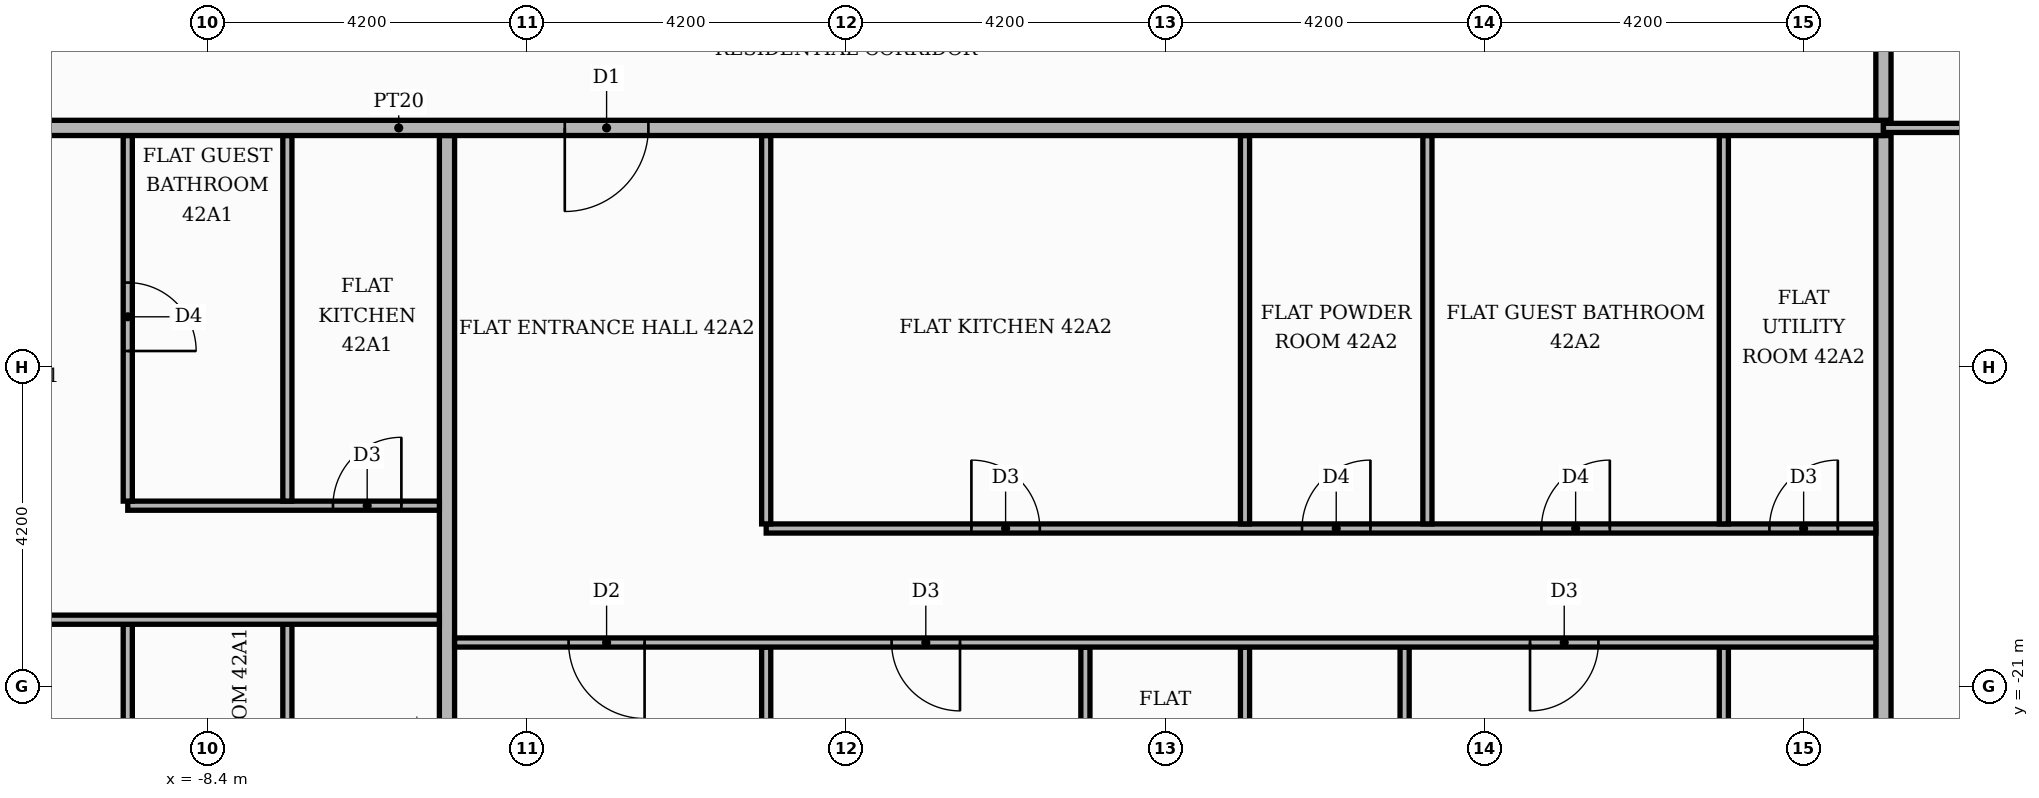
"""IFC4 building model, lengths in metres.
Left out: names, types, materials, properties, quantities, classifications, styles, units other than length and angle.
Written with IfcOpenShell. Run it as: python <this file> out.ifc"""

import sys

from ifc_helpers import new_model, si_unit, direction, frame, frame_2d, origin, place, context, subcontext, project, spatial, rectangle, extrude, element, fill, save


model = new_model("IFC4")
c1 = context("Model", 3, precision=1e-05, world=origin(), true_north=direction((0.0, 1.0)))
c2 = subcontext(c1, "Body", "Model", "MODEL_VIEW")
j1 = project(units=[si_unit("LENGTHUNIT", "METRE"), si_unit("PLANEANGLEUNIT", "RADIAN")], contexts=[c1])
p1 = place(None, origin())
s1 = spatial("IfcSite", under=j1, at=p1, CompositionType="ELEMENT")
p2 = place(p1, origin())
s2 = spatial("IfcBuilding", under=s1, at=p2, CompositionType="ELEMENT")
p3 = place(p2, frame((0.0, 0.0, 176.7)))
s3 = spatial("IfcBuildingStorey", under=s2, at=p3, CompositionType="ELEMENT", Elevation=176.7)
p4 = place(p3, frame((-9.45, -25.42, 0.0), z_axis=(0.0, 0.0, 1.0), x_axis=(0.0, 1.0, 0.0)))
e1 = element("IfcWall", 1, at=p4, inside=s3, PredefinedType="PARTITIONING", context=c2, shape_type="SweptSolid", body=[
    extrude(rectangle(XDim=5.24, YDim=0.12, at=frame_2d((2.62, 0.0))), origin(), (0.0, 0.0, 1.0), 3.4),
])
p5 = place(p4, frame((2.05, 0.0, 0.0)))
e2 = element("IfcOpeningElement", 2, at=p5, cuts=e1, PredefinedType="OPENING", context=c2, shape_type="SweptSolid", body=[
    extrude(rectangle(XDim=0.9, YDim=2.1, at=frame_2d((0.45, 1.05))), frame((0.0, 0.07, 0.0), z_axis=(0.0, -1.0, 0.0), x_axis=(1.0, 0.0, 0.0)), (0.0, 0.0, 1.0), 0.14),
])
p6 = place(p3, frame((-7.35, -25.42, 0.0), z_axis=(0.0, 0.0, 1.0), x_axis=(0.0, 1.0, 0.0)))
e3 = element("IfcWall", 3, at=p6, inside=s3, PredefinedType="PARTITIONING", context=c2, shape_type="SweptSolid", body=[
    extrude(rectangle(XDim=5.24, YDim=0.12, at=frame_2d((2.62, 0.0))), origin(), (0.0, 0.0, 1.0), 3.4),
])
p7 = place(p6, frame((2.05, 0.0, 0.0)))
e4 = element("IfcOpeningElement", 4, at=p7, cuts=e3, PredefinedType="OPENING", context=c2, shape_type="SweptSolid", body=[
    extrude(rectangle(XDim=0.9, YDim=2.1, at=frame_2d((0.45, 1.05))), frame((0.0, 0.07, 0.0), z_axis=(0.0, -1.0, 0.0), x_axis=(1.0, 0.0, 0.0)), (0.0, 0.0, 1.0), 0.14),
])
p8 = place(p3, frame((-5.25, -25.42, 0.0), z_axis=(0.0, 0.0, 1.0), x_axis=(0.0, 1.0, 0.0)))
e5 = element("IfcWall", 5, at=p8, inside=s3, PredefinedType="PARTITIONING", context=c2, shape_type="SweptSolid", body=[
    extrude(rectangle(XDim=11.67, YDim=0.2, at=frame_2d((5.835, 0.0))), origin(), (0.0, 0.0, 1.0), 3.4),
])
p9 = place(p3, frame((-1.05, -25.42, 0.0), z_axis=(0.0, 0.0, 1.0), x_axis=(0.0, 1.0, 0.0)))
e6 = element("IfcWall", 6, at=p9, inside=s3, PredefinedType="PARTITIONING", context=c2, shape_type="SweptSolid", body=[
    extrude(rectangle(XDim=4.94, YDim=0.12, at=frame_2d((2.47, 0.0))), origin(), (0.0, 0.0, 1.0), 3.4),
])
p10 = place(p3, frame((3.15, -25.42, 0.0), z_axis=(0.0, 0.0, 1.0), x_axis=(0.0, 1.0, 0.0)))
e7 = element("IfcWall", 7, at=p10, inside=s3, PredefinedType="PARTITIONING", context=c2, shape_type="SweptSolid", body=[
    extrude(rectangle(XDim=4.94, YDim=0.12, at=frame_2d((2.47, 0.0))), origin(), (0.0, 0.0, 1.0), 3.4),
])
p11 = place(p10, frame((1.9, 0.0, 0.0)))
e8 = element("IfcOpeningElement", 8, at=p11, cuts=e7, PredefinedType="OPENING", context=c2, shape_type="SweptSolid", body=[
    extrude(rectangle(XDim=0.9, YDim=2.1, at=frame_2d((0.45, 1.05))), frame((0.0, 0.07, 0.0), z_axis=(0.0, -1.0, 0.0), x_axis=(1.0, 0.0, 0.0)), (0.0, 0.0, 1.0), 0.14),
])
p12 = place(p3, frame((5.25, -25.42, 0.0), z_axis=(0.0, 0.0, 1.0), x_axis=(0.0, 1.0, 0.0)))
e9 = element("IfcWall", 9, at=p12, inside=s3, PredefinedType="PARTITIONING", context=c2, shape_type="SweptSolid", body=[
    extrude(rectangle(XDim=4.94, YDim=0.12, at=frame_2d((2.47, 0.0))), origin(), (0.0, 0.0, 1.0), 3.4),
])
p13 = place(p12, frame((1.9, 0.0, 0.0)))
e10 = element("IfcOpeningElement", 10, at=p13, cuts=e9, PredefinedType="OPENING", context=c2, shape_type="SweptSolid", body=[
    extrude(rectangle(XDim=0.9, YDim=2.1, at=frame_2d((0.45, 1.05))), frame((0.0, 0.07, 0.0), z_axis=(0.0, -1.0, 0.0), x_axis=(1.0, 0.0, 0.0)), (0.0, 0.0, 1.0), 0.14),
])
p14 = place(p3, frame((7.35, -25.42, 0.0), z_axis=(0.0, 0.0, 1.0), x_axis=(0.0, 1.0, 0.0)))
e11 = element("IfcWall", 11, at=p14, inside=s3, PredefinedType="PARTITIONING", context=c2, shape_type="SweptSolid", body=[
    extrude(rectangle(XDim=4.94, YDim=0.12, at=frame_2d((2.47, 0.0))), origin(), (0.0, 0.0, 1.0), 3.4),
])
p15 = place(p3, frame((11.55, -25.42, 0.0), z_axis=(0.0, 0.0, 1.0), x_axis=(0.0, 1.0, 0.0)))
e12 = element("IfcWall", 12, at=p15, inside=s3, PredefinedType="PARTITIONING", context=c2, shape_type="SweptSolid", body=[
    extrude(rectangle(XDim=4.94, YDim=0.12, at=frame_2d((2.47, 0.0))), origin(), (0.0, 0.0, 1.0), 3.4),
])
p16 = place(p15, frame((1.9, 0.0, 0.0)))
e13 = element("IfcOpeningElement", 13, at=p16, cuts=e12, PredefinedType="OPENING", context=c2, shape_type="SweptSolid", body=[
    extrude(rectangle(XDim=0.9, YDim=2.1, at=frame_2d((0.45, 1.05))), frame((0.0, 0.07, 0.0), z_axis=(0.0, -1.0, 0.0), x_axis=(1.0, 0.0, 0.0)), (0.0, 0.0, 1.0), 0.14),
])
p17 = place(p3, frame((13.65, -25.42, 0.0), z_axis=(0.0, 0.0, 1.0), x_axis=(0.0, 1.0, 0.0)))
e14 = element("IfcWall", 14, at=p17, inside=s3, PredefinedType="PARTITIONING", context=c2, shape_type="SweptSolid", body=[
    extrude(rectangle(XDim=11.67, YDim=0.2, at=frame_2d((5.835, 0.0))), origin(), (0.0, 0.0, 1.0), 3.4),
])
p18 = place(p3, frame((-5.15, -20.42, 0.0), z_axis=(0.0, 0.0, 1.0), x_axis=(1.0, 0.0, 0.0)))
e15 = element("IfcWall", 15, at=p18, inside=s3, PredefinedType="PARTITIONING", context=c2, shape_type="SweptSolid", body=[
    extrude(rectangle(XDim=18.7, YDim=0.12, at=frame_2d((9.35, 0.0))), origin(), (0.0, 0.0, 1.0), 3.4),
])
p19 = place(p18, frame((1.5, 0.0, 0.0)))
e16 = element("IfcOpeningElement", 16, at=p19, cuts=e15, PredefinedType="OPENING", context=c2, shape_type="SweptSolid", body=[
    extrude(rectangle(XDim=1.0, YDim=2.1, at=frame_2d((0.5, 1.05))), frame((0.0, 0.07, 0.0), z_axis=(0.0, -1.0, 0.0), x_axis=(1.0, 0.0, 0.0)), (0.0, 0.0, 1.0), 0.14),
])
p20 = place(p18, frame((5.75, 0.0, 0.0)))
e17 = element("IfcOpeningElement", 17, at=p20, cuts=e15, PredefinedType="OPENING", context=c2, shape_type="SweptSolid", body=[
    extrude(rectangle(XDim=0.9, YDim=2.1, at=frame_2d((0.45, 1.05))), frame((0.0, 0.07, 0.0), z_axis=(0.0, -1.0, 0.0), x_axis=(1.0, 0.0, 0.0)), (0.0, 0.0, 1.0), 0.14),
])
p21 = place(p18, frame((14.15, 0.0, 0.0)))
e18 = element("IfcOpeningElement", 18, at=p21, cuts=e15, PredefinedType="OPENING", context=c2, shape_type="SweptSolid", body=[
    extrude(rectangle(XDim=0.9, YDim=2.1, at=frame_2d((0.45, 1.05))), frame((0.0, 0.07, 0.0), z_axis=(0.0, -1.0, 0.0), x_axis=(1.0, 0.0, 0.0)), (0.0, 0.0, 1.0), 0.14),
])
p22 = place(p3, frame((-25.42, -20.12, 0.0), z_axis=(0.0, 0.0, 1.0), x_axis=(1.0, 0.0, 0.0)))
e19 = element("IfcWall", 19, at=p22, inside=s3, PredefinedType="PARTITIONING", context=c2, shape_type="SweptSolid", body=[
    extrude(rectangle(XDim=20.07, YDim=0.12, at=frame_2d((10.035, 0.0))), origin(), (0.0, 0.0, 1.0), 3.4),
])
p23 = place(p22, frame((10.22, 0.0, 0.0)))
e20 = element("IfcOpeningElement", 20, at=p23, cuts=e19, PredefinedType="OPENING", context=c2, shape_type="SweptSolid", body=[
    extrude(rectangle(XDim=1.0, YDim=2.1, at=frame_2d((0.5, 1.05))), frame((0.0, 0.07, 0.0), z_axis=(0.0, -1.0, 0.0), x_axis=(1.0, 0.0, 0.0)), (0.0, 0.0, 1.0), 0.14),
])
p24 = place(p22, frame((13.42, 0.0, 0.0)))
e21 = element("IfcOpeningElement", 21, at=p24, cuts=e19, PredefinedType="OPENING", context=c2, shape_type="SweptSolid", body=[
    extrude(rectangle(XDim=0.9, YDim=2.1, at=frame_2d((0.45, 1.05))), frame((0.0, 0.07, 0.0), z_axis=(0.0, -1.0, 0.0), x_axis=(1.0, 0.0, 0.0)), (0.0, 0.0, 1.0), 0.14),
])
p25 = place(p3, frame((-1.05, -18.92, 0.0), z_axis=(0.0, 0.0, 1.0), x_axis=(1.0, 0.0, 0.0)))
e22 = element("IfcWall", 22, at=p25, inside=s3, PredefinedType="PARTITIONING", context=c2, shape_type="SweptSolid", body=[
    extrude(rectangle(XDim=14.6, YDim=0.12, at=frame_2d((7.3, 0.0))), origin(), (0.0, 0.0, 1.0), 3.4),
])
p26 = place(p25, frame((2.7, 0.0, 0.0)))
e23 = element("IfcOpeningElement", 23, at=p26, cuts=e22, PredefinedType="OPENING", context=c2, shape_type="SweptSolid", body=[
    extrude(rectangle(XDim=0.9, YDim=2.1, at=frame_2d((0.45, 1.05))), frame((0.0, 0.07, 0.0), z_axis=(0.0, -1.0, 0.0), x_axis=(1.0, 0.0, 0.0)), (0.0, 0.0, 1.0), 0.14),
])
p27 = place(p25, frame((7.05, 0.0, 0.0)))
e24 = element("IfcOpeningElement", 24, at=p27, cuts=e22, PredefinedType="OPENING", context=c2, shape_type="SweptSolid", body=[
    extrude(rectangle(XDim=0.9, YDim=2.1, at=frame_2d((0.45, 1.05))), frame((0.0, 0.07, 0.0), z_axis=(0.0, -1.0, 0.0), x_axis=(1.0, 0.0, 0.0)), (0.0, 0.0, 1.0), 0.14),
])
p28 = place(p25, frame((10.2, 0.0, 0.0)))
e25 = element("IfcOpeningElement", 25, at=p28, cuts=e22, PredefinedType="OPENING", context=c2, shape_type="SweptSolid", body=[
    extrude(rectangle(XDim=0.9, YDim=2.1, at=frame_2d((0.45, 1.05))), frame((0.0, 0.07, 0.0), z_axis=(0.0, -1.0, 0.0), x_axis=(1.0, 0.0, 0.0)), (0.0, 0.0, 1.0), 0.14),
])
p29 = place(p25, frame((13.2, 0.0, 0.0)))
e26 = element("IfcOpeningElement", 26, at=p29, cuts=e22, PredefinedType="OPENING", context=c2, shape_type="SweptSolid", body=[
    extrude(rectangle(XDim=0.9, YDim=2.1, at=frame_2d((0.45, 1.05))), frame((0.0, 0.07, 0.0), z_axis=(0.0, -1.0, 0.0), x_axis=(1.0, 0.0, 0.0)), (0.0, 0.0, 1.0), 0.14),
])
for number, where, z_axis, x_axis in (
    (27, (-1.05, -18.86, 0.0), (0.0, 0.0, 1.0), (0.0, 1.0, 0.0)),
    (28, (5.25, -18.86, 0.0), (0.0, 0.0, 1.0), (0.0, 1.0, 0.0)),
    (29, (7.65, -18.86, 0.0), (0.0, 0.0, 1.0), (0.0, 1.0, 0.0)),
    (30, (11.55, -18.86, 0.0), (0.0, 0.0, 1.0), (0.0, 1.0, 0.0)),
):
    element("IfcWall", number, at=place(p3, frame(where, z_axis=z_axis, x_axis=x_axis)), inside=s3, PredefinedType="PARTITIONING", context=c2, shape_type="SweptSolid", body=[
        extrude(rectangle(XDim=5.11, YDim=0.12, at=frame_2d((2.555, 0.0))), origin(), (0.0, 0.0, 1.0), 3.4),
    ])
p30 = place(p3, frame((-9.45, -18.62, 0.0), z_axis=(0.0, 0.0, 1.0), x_axis=(1.0, 0.0, 0.0)))
e31 = element("IfcWall", 31, at=p30, inside=s3, PredefinedType="PARTITIONING", context=c2, shape_type="SweptSolid", body=[
    extrude(rectangle(XDim=4.1, YDim=0.12, at=frame_2d((2.05, 0.0))), origin(), (0.0, 0.0, 1.0), 3.4),
])
p31 = place(p30, frame((2.7, 0.0, 0.0)))
e32 = element("IfcOpeningElement", 32, at=p31, cuts=e31, PredefinedType="OPENING", context=c2, shape_type="SweptSolid", body=[
    extrude(rectangle(XDim=0.9, YDim=2.1, at=frame_2d((0.45, 1.05))), frame((0.0, 0.07, 0.0), z_axis=(0.0, -1.0, 0.0), x_axis=(1.0, 0.0, 0.0)), (0.0, 0.0, 1.0), 0.14),
])
p32 = place(p3, frame((-9.45, -18.56, 0.0), z_axis=(0.0, 0.0, 1.0), x_axis=(0.0, 1.0, 0.0)))
e33 = element("IfcWall", 33, at=p32, inside=s3, PredefinedType="PARTITIONING", context=c2, shape_type="SweptSolid", body=[
    extrude(rectangle(XDim=4.81, YDim=0.12, at=frame_2d((2.405, 0.0))), origin(), (0.0, 0.0, 1.0), 3.4),
])
p33 = place(p32, frame((1.975, 0.0, 0.0)))
e34 = element("IfcOpeningElement", 34, at=p33, cuts=e33, PredefinedType="OPENING", context=c2, shape_type="SweptSolid", body=[
    extrude(rectangle(XDim=0.9, YDim=2.1, at=frame_2d((0.45, 1.05))), frame((0.0, 0.07, 0.0), z_axis=(0.0, -1.0, 0.0), x_axis=(1.0, 0.0, 0.0)), (0.0, 0.0, 1.0), 0.14),
])
p34 = place(p3, frame((-7.35, -18.56, 0.0), z_axis=(0.0, 0.0, 1.0), x_axis=(0.0, 1.0, 0.0)))
e35 = element("IfcWall", 35, at=p34, inside=s3, PredefinedType="PARTITIONING", context=c2, shape_type="SweptSolid", body=[
    extrude(rectangle(XDim=4.81, YDim=0.12, at=frame_2d((2.405, 0.0))), origin(), (0.0, 0.0, 1.0), 3.4),
])
p35 = place(p3, frame((-25.42, -13.65, 0.0), z_axis=(0.0, 0.0, 1.0), x_axis=(1.0, 0.0, 0.0)))
e36 = element("IfcWall", 36, at=p35, inside=s3, PredefinedType="PARTITIONING", context=c2, shape_type="SweptSolid", body=[
    extrude(rectangle(XDim=39.07, YDim=0.2, at=frame_2d((19.535, 0.0))), origin(), (0.0, 0.0, 1.0), 3.4),
])
p36 = place(p35, frame((13.32, 0.0, 0.0)))
e37 = element("IfcOpeningElement", 37, at=p36, cuts=e36, PredefinedType="OPENING", context=c2, shape_type="SweptSolid", body=[
    extrude(rectangle(XDim=1.1, YDim=2.4, at=frame_2d((0.55, 1.2))), frame((0.0, 0.11, 0.0), z_axis=(0.0, -1.0, 0.0), x_axis=(1.0, 0.0, 0.0)), (0.0, 0.0, 1.0), 0.22),
])
p37 = place(p35, frame((21.72, 0.0, 0.0)))
e38 = element("IfcOpeningElement", 38, at=p37, cuts=e36, PredefinedType="OPENING", context=c2, shape_type="SweptSolid", body=[
    extrude(rectangle(XDim=1.1, YDim=2.4, at=frame_2d((0.55, 1.2))), frame((0.0, 0.11, 0.0), z_axis=(0.0, -1.0, 0.0), x_axis=(1.0, 0.0, 0.0)), (0.0, 0.0, 1.0), 0.22),
])
p38 = place(p3, frame((13.65, -13.65, 0.0), z_axis=(0.0, 0.0, 1.0), x_axis=(1.0, 0.0, 0.0)))
e39 = element("IfcWall", 39, at=p38, inside=s3, PredefinedType="PARTITIONING", context=c2, shape_type="SweptSolid", body=[
    extrude(rectangle(XDim=6.47, YDim=0.12, at=frame_2d((3.235, 0.0))), origin(), (0.0, 0.0, 1.0), 3.4),
])
p39 = place(p38, frame((2.785, 0.0, 0.0)))
e40 = element("IfcOpeningElement", 40, at=p39, cuts=e39, PredefinedType="OPENING", context=c2, shape_type="SweptSolid", body=[
    extrude(rectangle(XDim=0.9, YDim=2.1, at=frame_2d((0.45, 1.05))), frame((0.0, 0.07, 0.0), z_axis=(0.0, -1.0, 0.0), x_axis=(1.0, 0.0, 0.0)), (0.0, 0.0, 1.0), 0.14),
])
p40 = place(p3, frame((13.65, -13.55, 0.0), z_axis=(0.0, 0.0, 1.0), x_axis=(0.0, 1.0, 0.0)))
e41 = element("IfcWall", 41, at=p40, inside=s3, PredefinedType="PARTITIONING", context=c2, shape_type="SweptSolid", body=[
    extrude(rectangle(XDim=2.45, YDim=0.2, at=frame_2d((1.225, 0.0))), origin(), (0.0, 0.0, 1.0), 3.4),
])
p41 = place(p33, frame((0.9, 0.0, 0.0), z_axis=(0.0, 0.0, 1.0), x_axis=(-1.0, 0.0, 0.0)))
e42 = element("IfcDoor", 42, at=p41, inside=s3, OperationType="SINGLE_SWING_LEFT", PredefinedType="DOOR", context=c2, shape_type="SweptSolid", body=[
    extrude(rectangle(XDim=0.9, YDim=2.1, at=frame_2d((0.45, 1.05))), frame((0.0, 0.025, 0.0), z_axis=(0.0, -1.0, 0.0), x_axis=(1.0, 0.0, 0.0)), (0.0, 0.0, 1.0), 0.05),
])
fill(e34, e42)
p42 = place(p31, origin())
e43 = element("IfcDoor", 43, at=p42, inside=s3, OperationType="SINGLE_SWING_RIGHT", PredefinedType="DOOR", context=c2, shape_type="SweptSolid", body=[
    extrude(rectangle(XDim=0.9, YDim=2.1, at=frame_2d((0.45, 1.05))), frame((0.0, 0.025, 0.0), z_axis=(0.0, -1.0, 0.0), x_axis=(1.0, 0.0, 0.0)), (0.0, 0.0, 1.0), 0.05),
])
fill(e32, e43)
p43 = place(p37, frame((1.1, 0.0, 0.0), z_axis=(0.0, 0.0, 1.0), x_axis=(-1.0, 0.0, 0.0)))
e44 = element("IfcDoor", 44, at=p43, inside=s3, OperationType="SINGLE_SWING_LEFT", PredefinedType="DOOR", context=c2, shape_type="SweptSolid", body=[
    extrude(rectangle(XDim=1.1, YDim=2.4, at=frame_2d((0.55, 1.2))), frame((0.0, 0.025, 0.0), z_axis=(0.0, -1.0, 0.0), x_axis=(1.0, 0.0, 0.0)), (0.0, 0.0, 1.0), 0.05),
])
fill(e38, e44)
p44 = place(p26, origin())
e45 = element("IfcDoor", 45, at=p44, inside=s3, OperationType="SINGLE_SWING_LEFT", PredefinedType="DOOR", context=c2, shape_type="SweptSolid", body=[
    extrude(rectangle(XDim=0.9, YDim=2.1, at=frame_2d((0.45, 1.05))), frame((0.0, 0.025, 0.0), z_axis=(0.0, -1.0, 0.0), x_axis=(1.0, 0.0, 0.0)), (0.0, 0.0, 1.0), 0.05),
])
fill(e23, e45)
p45 = place(p27, origin())
e46 = element("IfcDoor", 46, at=p45, inside=s3, OperationType="SINGLE_SWING_RIGHT", PredefinedType="DOOR", context=c2, shape_type="SweptSolid", body=[
    extrude(rectangle(XDim=0.9, YDim=2.1, at=frame_2d((0.45, 1.05))), frame((0.0, 0.025, 0.0), z_axis=(0.0, -1.0, 0.0), x_axis=(1.0, 0.0, 0.0)), (0.0, 0.0, 1.0), 0.05),
])
fill(e24, e46)
p46 = place(p28, origin())
e47 = element("IfcDoor", 47, at=p46, inside=s3, OperationType="SINGLE_SWING_RIGHT", PredefinedType="DOOR", context=c2, shape_type="SweptSolid", body=[
    extrude(rectangle(XDim=0.9, YDim=2.1, at=frame_2d((0.45, 1.05))), frame((0.0, 0.025, 0.0), z_axis=(0.0, -1.0, 0.0), x_axis=(1.0, 0.0, 0.0)), (0.0, 0.0, 1.0), 0.05),
])
fill(e25, e47)
p47 = place(p29, origin())
e48 = element("IfcDoor", 48, at=p47, inside=s3, OperationType="SINGLE_SWING_RIGHT", PredefinedType="DOOR", context=c2, shape_type="SweptSolid", body=[
    extrude(rectangle(XDim=0.9, YDim=2.1, at=frame_2d((0.45, 1.05))), frame((0.0, 0.025, 0.0), z_axis=(0.0, -1.0, 0.0), x_axis=(1.0, 0.0, 0.0)), (0.0, 0.0, 1.0), 0.05),
])
fill(e26, e48)
p48 = place(p19, frame((1.0, 0.0, 0.0), z_axis=(0.0, 0.0, 1.0), x_axis=(-1.0, 0.0, 0.0)))
e49 = element("IfcDoor", 49, at=p48, inside=s3, OperationType="SINGLE_SWING_RIGHT", PredefinedType="DOOR", context=c2, shape_type="SweptSolid", body=[
    extrude(rectangle(XDim=1.0, YDim=2.1, at=frame_2d((0.5, 1.05))), frame((0.0, 0.025, 0.0), z_axis=(0.0, -1.0, 0.0), x_axis=(1.0, 0.0, 0.0)), (0.0, 0.0, 1.0), 0.05),
])
fill(e16, e49)
p49 = place(p20, frame((0.9, 0.0, 0.0), z_axis=(0.0, 0.0, 1.0), x_axis=(-1.0, 0.0, 0.0)))
e50 = element("IfcDoor", 50, at=p49, inside=s3, OperationType="SINGLE_SWING_RIGHT", PredefinedType="DOOR", context=c2, shape_type="SweptSolid", body=[
    extrude(rectangle(XDim=0.9, YDim=2.1, at=frame_2d((0.45, 1.05))), frame((0.0, 0.025, 0.0), z_axis=(0.0, -1.0, 0.0), x_axis=(1.0, 0.0, 0.0)), (0.0, 0.0, 1.0), 0.05),
])
fill(e17, e50)
p50 = place(p21, frame((0.9, 0.0, 0.0), z_axis=(0.0, 0.0, 1.0), x_axis=(-1.0, 0.0, 0.0)))
e51 = element("IfcDoor", 51, at=p50, inside=s3, OperationType="SINGLE_SWING_LEFT", PredefinedType="DOOR", context=c2, shape_type="SweptSolid", body=[
    extrude(rectangle(XDim=0.9, YDim=2.1, at=frame_2d((0.45, 1.05))), frame((0.0, 0.025, 0.0), z_axis=(0.0, -1.0, 0.0), x_axis=(1.0, 0.0, 0.0)), (0.0, 0.0, 1.0), 0.05),
])
fill(e18, e51)
save(model, sys.argv[1])
